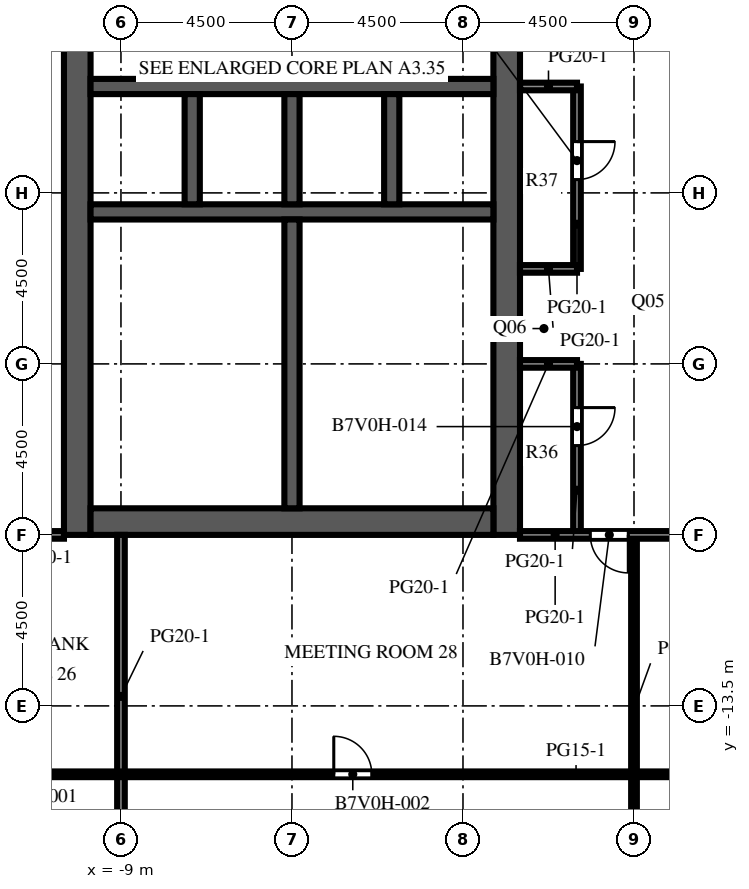
"""IFC4 building model, lengths in metres.
Left out: names, types, materials, properties, quantities, classifications, styles, units other than length and angle.
Written with IfcOpenShell. Run it as: python <this file> out.ifc"""

import sys

from ifc_helpers import new_model, si_unit, direction, frame, frame_2d, origin, place, context, subcontext, project, spatial, rectangle, extrude, element, fill, save


model = new_model("IFC4")
c1 = context("Model", 3, precision=1e-05, world=origin(), true_north=direction((0.0, 1.0)))
c2 = subcontext(c1, "Body", "Model", "MODEL_VIEW")
j1 = project(units=[si_unit("LENGTHUNIT", "METRE"), si_unit("PLANEANGLEUNIT", "RADIAN")], contexts=[c1])
p1 = place(None, origin())
s1 = spatial("IfcSite", under=j1, at=p1, CompositionType="ELEMENT")
p2 = place(p1, origin())
s2 = spatial("IfcBuilding", under=s1, at=p2, CompositionType="ELEMENT")
p3 = place(p2, frame((0.0, 0.0, 231.6)))
s3 = spatial("IfcBuildingStorey", under=s2, at=p3, CompositionType="ELEMENT", Elevation=231.6)
p4 = place(p3, frame((-10.15, -9.0, 0.0), z_axis=(0.0, 0.0, 1.0), x_axis=(0.0, 1.0, 0.0)))
e1 = element("IfcWall", 1, at=p4, inside=s3, PredefinedType="SHEAR", context=c2, shape_type="SweptSolid", body=[
    extrude(rectangle(XDim=27.5, YDim=0.7, at=frame_2d((13.75, 0.0))), origin(), (0.0, 0.0, 1.0), 4.1),
])
p5 = place(p4, frame((12.55, 0.0, 0.0)))
e2 = element("IfcOpeningElement", 2, at=p5, cuts=e1, PredefinedType="OPENING", context=c2, shape_type="SweptSolid", body=[
    extrude(rectangle(XDim=2.4, YDim=2.4, at=frame_2d((1.2, 1.2))), frame((0.0, 0.36, 0.0), z_axis=(0.0, -1.0, 0.0), x_axis=(1.0, 0.0, 0.0)), (0.0, 0.0, 1.0), 0.72),
])
p6 = place(p4, frame((6.825, 0.0, 0.0)))
e3 = element("IfcOpeningElement", 3, at=p6, cuts=e1, PredefinedType="OPENING", context=c2, shape_type="SweptSolid", body=[
    extrude(rectangle(XDim=1.2, YDim=2.1, at=frame_2d((0.6, 1.05))), frame((0.0, 0.36, 0.0), z_axis=(0.0, -1.0, 0.0), x_axis=(1.0, 0.0, 0.0)), (0.0, 0.0, 1.0), 0.72),
])
p7 = place(p4, frame((19.475, 0.0, 0.0)))
e4 = element("IfcOpeningElement", 4, at=p7, cuts=e1, PredefinedType="OPENING", context=c2, shape_type="SweptSolid", body=[
    extrude(rectangle(XDim=1.2, YDim=2.1, at=frame_2d((0.6, 1.05))), frame((0.0, 0.36, 0.0), z_axis=(0.0, -1.0, 0.0), x_axis=(1.0, 0.0, 0.0)), (0.0, 0.0, 1.0), 0.72),
])
p8 = place(p3, frame((1.15, -9.0, 0.0), z_axis=(0.0, 0.0, 1.0), x_axis=(0.0, 1.0, 0.0)))
e5 = element("IfcWall", 5, at=p8, inside=s3, PredefinedType="SHEAR", context=c2, shape_type="SweptSolid", body=[
    extrude(rectangle(XDim=27.5, YDim=0.7, at=frame_2d((13.75, 0.0))), origin(), (0.0, 0.0, 1.0), 4.1),
])
p9 = place(p8, frame((12.55, 0.0, 0.0)))
e6 = element("IfcOpeningElement", 6, at=p9, cuts=e5, PredefinedType="OPENING", context=c2, shape_type="SweptSolid", body=[
    extrude(rectangle(XDim=2.4, YDim=2.4, at=frame_2d((1.2, 1.2))), frame((0.0, 0.36, 0.0), z_axis=(0.0, -1.0, 0.0), x_axis=(1.0, 0.0, 0.0)), (0.0, 0.0, 1.0), 0.72),
])
p10 = place(p8, frame((5.42, 0.0, 0.0)))
e7 = element("IfcOpeningElement", 7, at=p10, cuts=e5, PredefinedType="OPENING", context=c2, shape_type="SweptSolid", body=[
    extrude(rectangle(XDim=1.2, YDim=2.1, at=frame_2d((0.6, 1.05))), frame((0.0, 0.36, 0.0), z_axis=(0.0, -1.0, 0.0), x_axis=(1.0, 0.0, 0.0)), (0.0, 0.0, 1.0), 0.72),
])
p11 = place(p8, frame((19.46, 0.0, 0.0)))
e8 = element("IfcOpeningElement", 8, at=p11, cuts=e5, PredefinedType="OPENING", context=c2, shape_type="SweptSolid", body=[
    extrude(rectangle(XDim=1.0, YDim=2.1, at=frame_2d((0.5, 1.05))), frame((0.0, 0.36, 0.0), z_axis=(0.0, -1.0, 0.0), x_axis=(1.0, 0.0, 0.0)), (0.0, 0.0, 1.0), 0.72),
])
p12 = place(p8, frame((21.17, 0.0, 0.0)))
e9 = element("IfcOpeningElement", 9, at=p12, cuts=e5, PredefinedType="OPENING", context=c2, shape_type="SweptSolid", body=[
    extrude(rectangle(XDim=1.0, YDim=2.1, at=frame_2d((0.5, 1.05))), frame((0.0, 0.36, 0.0), z_axis=(0.0, -1.0, 0.0), x_axis=(1.0, 0.0, 0.0)), (0.0, 0.0, 1.0), 0.72),
])
p13 = place(p8, frame((23.26, 0.0, 0.0)))
e10 = element("IfcOpeningElement", 10, at=p13, cuts=e5, PredefinedType="OPENING", context=c2, shape_type="SweptSolid", body=[
    extrude(rectangle(XDim=1.0, YDim=2.1, at=frame_2d((0.5, 1.05))), frame((0.0, 0.36, 0.0), z_axis=(0.0, -1.0, 0.0), x_axis=(1.0, 0.0, 0.0)), (0.0, 0.0, 1.0), 0.72),
])
p14 = place(p8, frame((25.35, 0.0, 0.0)))
e11 = element("IfcOpeningElement", 11, at=p14, cuts=e5, PredefinedType="OPENING", context=c2, shape_type="SweptSolid", body=[
    extrude(rectangle(XDim=1.0, YDim=2.1, at=frame_2d((0.5, 1.05))), frame((0.0, 0.36, 0.0), z_axis=(0.0, -1.0, 0.0), x_axis=(1.0, 0.0, 0.0)), (0.0, 0.0, 1.0), 0.72),
])
p15 = place(p3, frame((-9.8, -8.65, 0.0), z_axis=(0.0, 0.0, 1.0), x_axis=(1.0, 0.0, 0.0)))
e12 = element("IfcWall", 12, at=p15, inside=s3, PredefinedType="SHEAR", context=c2, shape_type="SweptSolid", body=[
    extrude(rectangle(XDim=10.6, YDim=0.7, at=frame_2d((5.3, 0.0))), origin(), (0.0, 0.0, 1.0), 4.1),
])
p16 = place(p3, frame((-9.8, -0.5, 0.0), z_axis=(0.0, 0.0, 1.0), x_axis=(1.0, 0.0, 0.0)))
e13 = element("IfcWall", 13, at=p16, inside=s3, PredefinedType="SHEAR", context=c2, shape_type="SweptSolid", body=[
    extrude(rectangle(XDim=10.6, YDim=0.4, at=frame_2d((5.3, 0.0))), origin(), (0.0, 0.0, 1.0), 4.1),
])
p17 = place(p3, frame((-9.8, 2.8, 0.0), z_axis=(0.0, 0.0, 1.0), x_axis=(1.0, 0.0, 0.0)))
e14 = element("IfcWall", 14, at=p17, inside=s3, PredefinedType="SHEAR", context=c2, shape_type="SweptSolid", body=[
    extrude(rectangle(XDim=10.6, YDim=0.4, at=frame_2d((5.3, 0.0))), origin(), (0.0, 0.0, 1.0), 4.1),
])
p18 = place(p17, frame((0.688, 0.0, 0.0)))
e15 = element("IfcOpeningElement", 15, at=p18, cuts=e14, PredefinedType="OPENING", context=c2, shape_type="SweptSolid", body=[
    extrude(rectangle(XDim=1.1, YDim=2.1, at=frame_2d((0.55, 1.05))), frame((0.0, 0.21, 0.0), z_axis=(0.0, -1.0, 0.0), x_axis=(1.0, 0.0, 0.0)), (0.0, 0.0, 1.0), 0.42),
])
p19 = place(p17, frame((3.438, 0.0, 0.0)))
e16 = element("IfcOpeningElement", 16, at=p19, cuts=e14, PredefinedType="OPENING", context=c2, shape_type="SweptSolid", body=[
    extrude(rectangle(XDim=1.1, YDim=2.1, at=frame_2d((0.55, 1.05))), frame((0.0, 0.21, 0.0), z_axis=(0.0, -1.0, 0.0), x_axis=(1.0, 0.0, 0.0)), (0.0, 0.0, 1.0), 0.42),
])
p20 = place(p17, frame((6.113, 0.0, 0.0)))
e17 = element("IfcOpeningElement", 17, at=p20, cuts=e14, PredefinedType="OPENING", context=c2, shape_type="SweptSolid", body=[
    extrude(rectangle(XDim=1.0, YDim=2.1, at=frame_2d((0.5, 1.05))), frame((0.0, 0.21, 0.0), z_axis=(0.0, -1.0, 0.0), x_axis=(1.0, 0.0, 0.0)), (0.0, 0.0, 1.0), 0.42),
])
p21 = place(p17, frame((8.863, 0.0, 0.0)))
e18 = element("IfcOpeningElement", 18, at=p21, cuts=e14, PredefinedType="OPENING", context=c2, shape_type="SweptSolid", body=[
    extrude(rectangle(XDim=1.0, YDim=2.1, at=frame_2d((0.5, 1.05))), frame((0.0, 0.21, 0.0), z_axis=(0.0, -1.0, 0.0), x_axis=(1.0, 0.0, 0.0)), (0.0, 0.0, 1.0), 0.42),
])
for number, where, z_axis, x_axis in (
    (19, (-7.125, -0.3, 0.0), (0.0, 0.0, 1.0), (0.0, 1.0, 0.0)),
    (20, (-4.5, -0.3, 0.0), (0.0, 0.0, 1.0), (0.0, 1.0, 0.0)),
    (21, (-1.875, -0.3, 0.0), (0.0, 0.0, 1.0), (0.0, 1.0, 0.0)),
):
    element("IfcWall", number, at=place(p3, frame(where, z_axis=z_axis, x_axis=x_axis)), inside=s3, PredefinedType="SHEAR", context=c2, shape_type="SweptSolid", body=[
        extrude(rectangle(XDim=2.9, YDim=0.4, at=frame_2d((1.45, 0.0))), origin(), (0.0, 0.0, 1.0), 4.1),
    ])
p22 = place(p3, frame((-4.5, -8.3, 0.0), z_axis=(0.0, 0.0, 1.0), x_axis=(0.0, 1.0, 0.0)))
e22 = element("IfcWall", 22, at=p22, inside=s3, PredefinedType="SHEAR", context=c2, shape_type="SweptSolid", body=[
    extrude(rectangle(XDim=7.6, YDim=0.4, at=frame_2d((3.8, 0.0))), origin(), (0.0, 0.0, 1.0), 4.1),
])
p23 = place(p3, frame((-0.7, -5.26, 0.0), z_axis=(0.0, 0.0, 1.0), x_axis=(1.0, 0.0, 0.0)))
e23 = element("IfcWall", 23, at=p23, inside=s3, PredefinedType="PARTITIONING", context=c2, shape_type="SweptSolid", body=[
    extrude(rectangle(XDim=1.5, YDim=0.1, at=frame_2d((0.75, 0.0))), origin(), (0.0, 0.0, 1.0), 3.65),
])
p24 = place(p23, frame((0.25, 0.0, 0.0)))
e24 = element("IfcOpeningElement", 24, at=p24, cuts=e23, PredefinedType="OPENING", context=c2, shape_type="SweptSolid", body=[
    extrude(rectangle(XDim=1.0, YDim=2.1, at=frame_2d((0.5, 1.05))), frame((0.0, 0.06, 0.0), z_axis=(0.0, -1.0, 0.0), x_axis=(1.0, 0.0, 0.0)), (0.0, 0.0, 1.0), 0.12),
])
p25 = place(p3, frame((-0.7, -5.26, 0.0), z_axis=(0.0, 0.0, 1.0), x_axis=(0.0, 1.0, 0.0)))
e25 = element("IfcWall", 25, at=p25, inside=s3, PredefinedType="PARTITIONING", context=c2, shape_type="SweptSolid", body=[
    extrude(rectangle(XDim=2.28, YDim=0.1, at=frame_2d((1.14, 0.0))), origin(), (0.0, 0.0, 1.0), 3.65),
])
p26 = place(p25, frame((0.64, 0.0, 0.0)))
e26 = element("IfcOpeningElement", 26, at=p26, cuts=e25, PredefinedType="OPENING", context=c2, shape_type="SweptSolid", body=[
    extrude(rectangle(XDim=1.0, YDim=2.1, at=frame_2d((0.5, 1.05))), frame((0.0, 0.06, 0.0), z_axis=(0.0, -1.0, 0.0), x_axis=(1.0, 0.0, 0.0)), (0.0, 0.0, 1.0), 0.12),
])
p27 = place(p3, frame((-0.7, -2.98, 0.0), z_axis=(0.0, 0.0, 1.0), x_axis=(0.0, 1.0, 0.0)))
e27 = element("IfcWall", 27, at=p27, inside=s3, PredefinedType="PARTITIONING", context=c2, shape_type="SweptSolid", body=[
    extrude(rectangle(XDim=2.28, YDim=0.1, at=frame_2d((1.14, 0.0))), origin(), (0.0, 0.0, 1.0), 3.65),
])
p28 = place(p27, frame((0.64, 0.0, 0.0)))
e28 = element("IfcOpeningElement", 28, at=p28, cuts=e27, PredefinedType="OPENING", context=c2, shape_type="SweptSolid", body=[
    extrude(rectangle(XDim=1.0, YDim=2.1, at=frame_2d((0.5, 1.05))), frame((0.0, 0.06, 0.0), z_axis=(0.0, -1.0, 0.0), x_axis=(1.0, 0.0, 0.0)), (0.0, 0.0, 1.0), 0.12),
])
for number, where, z_axis, x_axis in (
    (29, (-4.3, -5.26, 0.0), (0.0, 0.0, 1.0), (1.0, 0.0, 0.0)),
    (30, (-4.3, -2.98, 0.0), (0.0, 0.0, 1.0), (1.0, 0.0, 0.0)),
):
    element("IfcWall", number, at=place(p3, frame(where, z_axis=z_axis, x_axis=x_axis)), inside=s3, PredefinedType="PARTITIONING", context=c2, shape_type="SweptSolid", body=[
        extrude(rectangle(XDim=3.6, YDim=0.1, at=frame_2d((1.8, 0.0))), origin(), (0.0, 0.0, 1.0), 3.65),
    ])
p29 = place(p3, frame((-9.0, -17.5, 0.0), z_axis=(0.0, 0.0, 1.0), x_axis=(0.0, 1.0, 0.0)))
e31 = element("IfcWall", 31, at=p29, inside=s3, PredefinedType="PARTITIONING", context=c2, shape_type="SweptSolid", body=[
    extrude(rectangle(XDim=8.5, YDim=0.2, at=frame_2d((4.25, 0.0))), origin(), (0.0, 0.0, 1.0), 3.65),
])
p30 = place(p3, frame((3.0, -9.0, 0.0), z_axis=(0.0, 0.0, 1.0), x_axis=(0.0, 1.0, 0.0)))
e32 = element("IfcWall", 32, at=p30, inside=s3, PredefinedType="PARTITIONING", context=c2, shape_type="SweptSolid", body=[
    extrude(rectangle(XDim=4.5, YDim=0.2, at=frame_2d((2.25, 0.0))), origin(), (0.0, 0.0, 1.0), 3.65),
])
p31 = place(p30, frame((2.35, 0.0, 0.0)))
e33 = element("IfcOpeningElement", 33, at=p31, cuts=e32, PredefinedType="OPENING", context=c2, shape_type="SweptSolid", body=[
    extrude(rectangle(XDim=1.0, YDim=2.1, at=frame_2d((0.5, 1.05))), frame((0.0, 0.11, 0.0), z_axis=(0.0, -1.0, 0.0), x_axis=(1.0, 0.0, 0.0)), (0.0, 0.0, 1.0), 0.22),
])
p32 = place(p3, frame((3.0, -2.0, 0.0), z_axis=(0.0, 0.0, 1.0), x_axis=(0.0, 1.0, 0.0)))
e34 = element("IfcWall", 34, at=p32, inside=s3, PredefinedType="PARTITIONING", context=c2, shape_type="SweptSolid", body=[
    extrude(rectangle(XDim=4.8, YDim=0.2, at=frame_2d((2.4, 0.0))), origin(), (0.0, 0.0, 1.0), 3.65),
])
p33 = place(p32, frame((2.35, 0.0, 0.0)))
e35 = element("IfcOpeningElement", 35, at=p33, cuts=e34, PredefinedType="OPENING", context=c2, shape_type="SweptSolid", body=[
    extrude(rectangle(XDim=1.0, YDim=2.1, at=frame_2d((0.5, 1.05))), frame((0.0, 0.11, 0.0), z_axis=(0.0, -1.0, 0.0), x_axis=(1.0, 0.0, 0.0)), (0.0, 0.0, 1.0), 0.22),
])
p34 = place(p3, frame((4.5, -9.0, 0.0), z_axis=(0.0, 0.0, 1.0), x_axis=(0.0, -1.0, 0.0)))
e36 = element("IfcWall", 36, at=p34, inside=s3, PredefinedType="PARTITIONING", context=c2, shape_type="SweptSolid", body=[
    extrude(rectangle(XDim=13.1, YDim=0.15, at=frame_2d((6.55, 0.0))), origin(), (0.0, 0.0, 1.0), 3.65),
])
p35 = place(p34, frame((9.15, 0.0, 0.0)))
e37 = element("IfcOpeningElement", 37, at=p35, cuts=e36, PredefinedType="OPENING", context=c2, shape_type="SweptSolid", body=[
    extrude(rectangle(XDim=1.0, YDim=2.1, at=frame_2d((0.5, 1.05))), frame((0.0, 0.085, 0.0), z_axis=(0.0, -1.0, 0.0), x_axis=(1.0, 0.0, 0.0)), (0.0, 0.0, 1.0), 0.17),
])
p36 = place(p3, frame((21.0, -15.3, 0.0), z_axis=(0.0, 0.0, 1.0), x_axis=(-1.0, 0.0, 0.0)))
e38 = element("IfcWall", 38, at=p36, inside=s3, PredefinedType="PARTITIONING", context=c2, shape_type="SweptSolid", body=[
    extrude(rectangle(XDim=34.5, YDim=0.15, at=frame_2d((17.25, 0.0))), origin(), (0.0, 0.0, 1.0), 3.65),
])
p37 = place(p36, frame((31.9, 0.0, 0.0)))
e39 = element("IfcOpeningElement", 39, at=p37, cuts=e38, PredefinedType="OPENING", context=c2, shape_type="SweptSolid", body=[
    extrude(rectangle(XDim=1.0, YDim=2.1, at=frame_2d((0.5, 1.05))), frame((0.0, 0.085, 0.0), z_axis=(0.0, -1.0, 0.0), x_axis=(1.0, 0.0, 0.0)), (0.0, 0.0, 1.0), 0.17),
])
p38 = place(p36, frame((23.4, 0.0, 0.0)))
e40 = element("IfcOpeningElement", 40, at=p38, cuts=e38, PredefinedType="OPENING", context=c2, shape_type="SweptSolid", body=[
    extrude(rectangle(XDim=1.0, YDim=2.1, at=frame_2d((0.5, 1.05))), frame((0.0, 0.085, 0.0), z_axis=(0.0, -1.0, 0.0), x_axis=(1.0, 0.0, 0.0)), (0.0, 0.0, 1.0), 0.17),
])
p39 = place(p36, frame((11.65, 0.0, 0.0)))
e41 = element("IfcOpeningElement", 41, at=p39, cuts=e38, PredefinedType="OPENING", context=c2, shape_type="SweptSolid", body=[
    extrude(rectangle(XDim=1.0, YDim=2.1, at=frame_2d((0.5, 1.05))), frame((0.0, 0.085, 0.0), z_axis=(0.0, -1.0, 0.0), x_axis=(1.0, 0.0, 0.0)), (0.0, 0.0, 1.0), 0.17),
])
p40 = place(p36, frame((2.65, 0.0, 0.0)))
e42 = element("IfcOpeningElement", 42, at=p40, cuts=e38, PredefinedType="OPENING", context=c2, shape_type="SweptSolid", body=[
    extrude(rectangle(XDim=1.0, YDim=2.1, at=frame_2d((0.5, 1.05))), frame((0.0, 0.085, 0.0), z_axis=(0.0, -1.0, 0.0), x_axis=(1.0, 0.0, 0.0)), (0.0, 0.0, 1.0), 0.17),
])
p41 = place(p3, frame((-10.5, -9.0, 0.0), z_axis=(0.0, 0.0, 1.0), x_axis=(-1.0, 0.0, 0.0)))
e43 = element("IfcWall", 43, at=p41, inside=s3, PredefinedType="PARTITIONING", context=c2, shape_type="SweptSolid", body=[
    extrude(rectangle(XDim=3.0, YDim=0.2, at=frame_2d((1.5, 0.0))), origin(), (0.0, 0.0, 1.0), 3.65),
])
p42 = place(p41, frame((1.15, 0.0, 0.0)))
e44 = element("IfcOpeningElement", 44, at=p42, cuts=e43, PredefinedType="OPENING", context=c2, shape_type="SweptSolid", body=[
    extrude(rectangle(XDim=1.0, YDim=2.1, at=frame_2d((0.5, 1.05))), frame((0.0, 0.11, 0.0), z_axis=(0.0, -1.0, 0.0), x_axis=(1.0, 0.0, 0.0)), (0.0, 0.0, 1.0), 0.22),
])
p43 = place(p3, frame((6.0, -9.0, 0.0), z_axis=(0.0, 0.0, 1.0), x_axis=(-1.0, 0.0, 0.0)))
e45 = element("IfcWall", 45, at=p43, inside=s3, PredefinedType="PARTITIONING", context=c2, shape_type="SweptSolid", body=[
    extrude(rectangle(XDim=4.5, YDim=0.2, at=frame_2d((2.25, 0.0))), origin(), (0.0, 0.0, 1.0), 3.65),
])
p44 = place(p43, frame((1.65, 0.0, 0.0)))
e46 = element("IfcOpeningElement", 46, at=p44, cuts=e45, PredefinedType="OPENING", context=c2, shape_type="SweptSolid", body=[
    extrude(rectangle(XDim=1.0, YDim=2.1, at=frame_2d((0.5, 1.05))), frame((0.0, 0.11, 0.0), z_axis=(0.0, -1.0, 0.0), x_axis=(1.0, 0.0, 0.0)), (0.0, 0.0, 1.0), 0.22),
])
for number, where, z_axis, x_axis in (
    (47, (1.5, -4.5, 0.0), (0.0, 0.0, 1.0), (1.0, 0.0, 0.0)),
    (48, (1.5, -2.0, 0.0), (0.0, 0.0, 1.0), (1.0, 0.0, 0.0)),
    (49, (1.5, 2.8, 0.0), (0.0, 0.0, 1.0), (1.0, 0.0, 0.0)),
):
    element("IfcWall", number, at=place(p3, frame(where, z_axis=z_axis, x_axis=x_axis)), inside=s3, PredefinedType="PARTITIONING", context=c2, shape_type="SweptSolid", body=[
        extrude(rectangle(XDim=1.5, YDim=0.2, at=frame_2d((0.75, 0.0))), origin(), (0.0, 0.0, 1.0), 3.65),
    ])
p45 = place(p18, origin())
e50 = element("IfcDoor", 50, at=p45, inside=s3, OperationType="DOUBLE_DOOR_SLIDING", PredefinedType="DOOR", context=c2, shape_type="SweptSolid", body=[
    extrude(rectangle(XDim=1.1, YDim=2.1, at=frame_2d((0.55, 1.05))), frame((0.0, 0.025, 0.0), z_axis=(0.0, -1.0, 0.0), x_axis=(1.0, 0.0, 0.0)), (0.0, 0.0, 1.0), 0.05),
])
fill(e15, e50)
p46 = place(p19, origin())
e51 = element("IfcDoor", 51, at=p46, inside=s3, OperationType="DOUBLE_DOOR_SLIDING", PredefinedType="DOOR", context=c2, shape_type="SweptSolid", body=[
    extrude(rectangle(XDim=1.1, YDim=2.1, at=frame_2d((0.55, 1.05))), frame((0.0, 0.025, 0.0), z_axis=(0.0, -1.0, 0.0), x_axis=(1.0, 0.0, 0.0)), (0.0, 0.0, 1.0), 0.05),
])
fill(e16, e51)
p47 = place(p5, origin())
e52 = element("IfcDoor", 52, at=p47, inside=s3, OperationType="DOUBLE_DOOR_DOUBLE_SWING", PredefinedType="DOOR", context=c2, shape_type="SweptSolid", body=[
    extrude(rectangle(XDim=2.4, YDim=2.4, at=frame_2d((1.2, 1.2))), frame((0.0, 0.025, 0.0), z_axis=(0.0, -1.0, 0.0), x_axis=(1.0, 0.0, 0.0)), (0.0, 0.0, 1.0), 0.05),
])
fill(e2, e52)
p48 = place(p9, origin())
e53 = element("IfcDoor", 53, at=p48, inside=s3, OperationType="DOUBLE_DOOR_DOUBLE_SWING", PredefinedType="DOOR", context=c2, shape_type="SweptSolid", body=[
    extrude(rectangle(XDim=2.4, YDim=2.4, at=frame_2d((1.2, 1.2))), frame((0.0, 0.025, 0.0), z_axis=(0.0, -1.0, 0.0), x_axis=(1.0, 0.0, 0.0)), (0.0, 0.0, 1.0), 0.05),
])
fill(e6, e53)
p49 = place(p6, origin())
e54 = element("IfcDoor", 54, at=p49, inside=s3, OperationType="SINGLE_SWING_LEFT", PredefinedType="DOOR", context=c2, shape_type="SweptSolid", body=[
    extrude(rectangle(XDim=1.2, YDim=2.1, at=frame_2d((0.6, 1.05))), frame((0.0, 0.025, 0.0), z_axis=(0.0, -1.0, 0.0), x_axis=(1.0, 0.0, 0.0)), (0.0, 0.0, 1.0), 0.05),
])
fill(e3, e54)
p50 = place(p20, origin())
e55 = element("IfcDoor", 55, at=p50, inside=s3, OperationType="SINGLE_SWING_LEFT", PredefinedType="DOOR", context=c2, shape_type="SweptSolid", body=[
    extrude(rectangle(XDim=1.0, YDim=2.1, at=frame_2d((0.5, 1.05))), frame((0.0, 0.025, 0.0), z_axis=(0.0, -1.0, 0.0), x_axis=(1.0, 0.0, 0.0)), (0.0, 0.0, 1.0), 0.05),
])
fill(e17, e55)
p51 = place(p21, origin())
e56 = element("IfcDoor", 56, at=p51, inside=s3, OperationType="SINGLE_SWING_RIGHT", PredefinedType="DOOR", context=c2, shape_type="SweptSolid", body=[
    extrude(rectangle(XDim=1.0, YDim=2.1, at=frame_2d((0.5, 1.05))), frame((0.0, 0.025, 0.0), z_axis=(0.0, -1.0, 0.0), x_axis=(1.0, 0.0, 0.0)), (0.0, 0.0, 1.0), 0.05),
])
fill(e18, e56)
p52 = place(p10, origin())
e57 = element("IfcDoor", 57, at=p52, inside=s3, OperationType="SINGLE_SWING_LEFT", PredefinedType="DOOR", context=c2, shape_type="SweptSolid", body=[
    extrude(rectangle(XDim=1.2, YDim=2.1, at=frame_2d((0.6, 1.05))), frame((0.0, 0.325, 0.0), z_axis=(0.0, -1.0, 0.0), x_axis=(1.0, 0.0, 0.0)), (0.0, 0.0, 1.0), 0.05),
])
fill(e7, e57)
p53 = place(p24, origin())
e58 = element("IfcDoor", 58, at=p53, inside=s3, OperationType="SINGLE_SWING_RIGHT", PredefinedType="DOOR", context=c2, shape_type="SweptSolid", body=[
    extrude(rectangle(XDim=1.0, YDim=2.1, at=frame_2d((0.5, 1.05))), frame((0.0, 0.025, 0.0), z_axis=(0.0, -1.0, 0.0), x_axis=(1.0, 0.0, 0.0)), (0.0, 0.0, 1.0), 0.05),
])
fill(e24, e58)
p54 = place(p26, origin())
e59 = element("IfcDoor", 59, at=p54, inside=s3, OperationType="SINGLE_SWING_LEFT", PredefinedType="DOOR", context=c2, shape_type="SweptSolid", body=[
    extrude(rectangle(XDim=1.0, YDim=2.1, at=frame_2d((0.5, 1.05))), frame((0.0, 0.025, 0.0), z_axis=(0.0, -1.0, 0.0), x_axis=(1.0, 0.0, 0.0)), (0.0, 0.0, 1.0), 0.05),
])
fill(e26, e59)
p55 = place(p28, origin())
e60 = element("IfcDoor", 60, at=p55, inside=s3, OperationType="SINGLE_SWING_RIGHT", PredefinedType="DOOR", context=c2, shape_type="SweptSolid", body=[
    extrude(rectangle(XDim=1.0, YDim=2.1, at=frame_2d((0.5, 1.05))), frame((0.0, 0.025, 0.0), z_axis=(0.0, -1.0, 0.0), x_axis=(1.0, 0.0, 0.0)), (0.0, 0.0, 1.0), 0.05),
])
fill(e28, e60)
p56 = place(p38, origin())
e61 = element("IfcDoor", 61, at=p56, inside=s3, OperationType="SINGLE_SWING_RIGHT", PredefinedType="DOOR", context=c2, shape_type="SweptSolid", body=[
    extrude(rectangle(XDim=1.0, YDim=2.1, at=frame_2d((0.5, 1.05))), frame((0.0, 0.025, 0.0), z_axis=(0.0, -1.0, 0.0), x_axis=(1.0, 0.0, 0.0)), (0.0, 0.0, 1.0), 0.05),
])
fill(e40, e61)
p57 = place(p44, origin())
e62 = element("IfcDoor", 62, at=p57, inside=s3, OperationType="SINGLE_SWING_LEFT", PredefinedType="DOOR", context=c2, shape_type="SweptSolid", body=[
    extrude(rectangle(XDim=1.0, YDim=2.1, at=frame_2d((0.5, 1.05))), frame((0.0, 0.025, 0.0), z_axis=(0.0, -1.0, 0.0), x_axis=(1.0, 0.0, 0.0)), (0.0, 0.0, 1.0), 0.05),
])
fill(e46, e62)
p58 = place(p31, origin())
e63 = element("IfcDoor", 63, at=p58, inside=s3, OperationType="SINGLE_SWING_RIGHT", PredefinedType="DOOR", context=c2, shape_type="SweptSolid", body=[
    extrude(rectangle(XDim=1.0, YDim=2.1, at=frame_2d((0.5, 1.05))), frame((0.0, 0.025, 0.0), z_axis=(0.0, -1.0, 0.0), x_axis=(1.0, 0.0, 0.0)), (0.0, 0.0, 1.0), 0.05),
])
fill(e33, e63)
p59 = place(p33, origin())
e64 = element("IfcDoor", 64, at=p59, inside=s3, OperationType="SINGLE_SWING_RIGHT", PredefinedType="DOOR", context=c2, shape_type="SweptSolid", body=[
    extrude(rectangle(XDim=1.0, YDim=2.1, at=frame_2d((0.5, 1.05))), frame((0.0, 0.025, 0.0), z_axis=(0.0, -1.0, 0.0), x_axis=(1.0, 0.0, 0.0)), (0.0, 0.0, 1.0), 0.05),
])
fill(e35, e64)
save(model, sys.argv[1])
